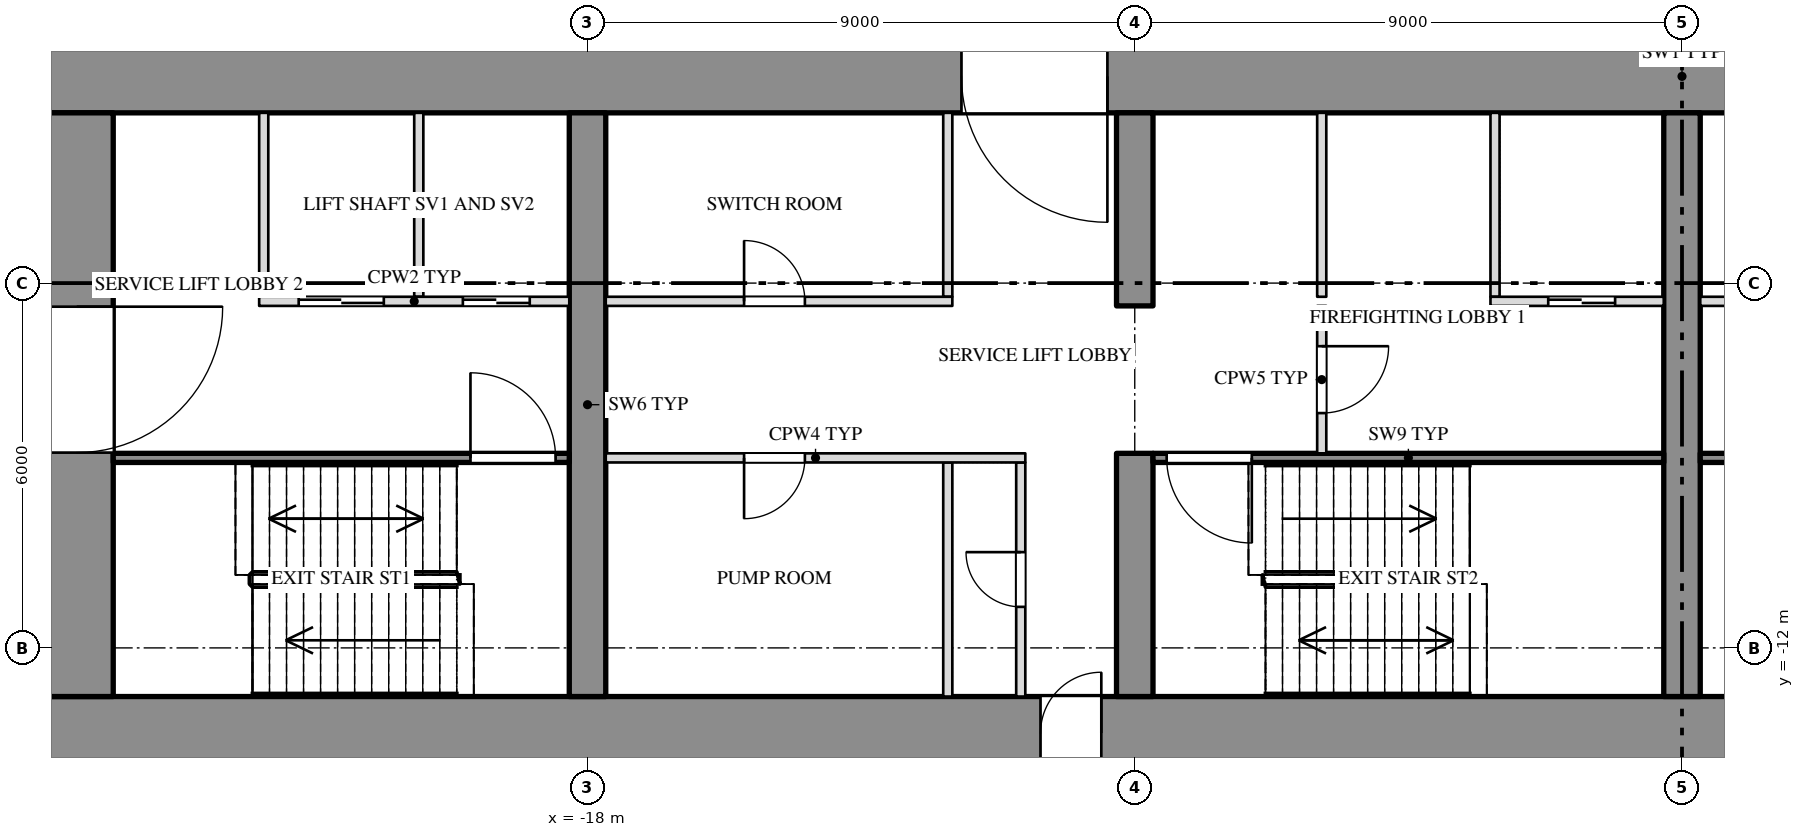
"""IFC4 building model, lengths in metres.
Left out: names, types, materials, properties, quantities, classifications, styles, units other than length and angle.
Written with IfcOpenShell. Run it as: python <this file> out.ifc"""

import sys

from ifc_helpers import new_model, si_unit, direction, frame, frame_2d, origin, place, context, subcontext, project, spatial, rectangle, extrude, element, fill, save


model = new_model("IFC4")
c1 = context("Model", 3, precision=1e-05, world=origin(), true_north=direction((0.0, 1.0)))
c2 = subcontext(c1, "Body", "Model", "MODEL_VIEW")
j1 = project(units=[si_unit("LENGTHUNIT", "METRE"), si_unit("PLANEANGLEUNIT", "RADIAN")], contexts=[c1])
p1 = place(None, origin())
s1 = spatial("IfcSite", under=j1, at=p1, CompositionType="ELEMENT")
p2 = place(p1, origin())
s2 = spatial("IfcBuilding", under=s1, at=p2, CompositionType="ELEMENT")
p3 = place(p2, frame((0.0, 0.0, -8.4)))
s3 = spatial("IfcBuildingStorey", under=s2, at=p3, CompositionType="ELEMENT", Elevation=-8.4)
p4 = place(p3, frame((-27.0, -2.6, 0.0), z_axis=(0.0, 0.0, 1.0), x_axis=(1.0, 0.0, 0.0)))
e1 = element("IfcWall", 1, at=p4, inside=s3, PredefinedType="SHEAR", context=c2, shape_type="SweptSolid", body=[
    extrude(rectangle(XDim=54.0, YDim=1.2, at=frame_2d((27.0, 0.0))), origin(), (0.0, 0.0, 1.0), 3.9),
])
p5 = place(p4, frame((15.15, 0.0, 0.0)))
e2 = element("IfcOpeningElement", 2, at=p5, cuts=e1, PredefinedType="OPENING", context=c2, shape_type="SweptSolid", body=[
    extrude(rectangle(XDim=2.4, YDim=2.1, at=frame_2d((1.2, 1.05))), frame((0.0, 0.612, 0.0), z_axis=(0.0, -1.0, 0.0), x_axis=(1.0, 0.0, 0.0)), (0.0, 0.0, 1.0), 1.224),
])
p6 = place(p4, frame((36.45, 0.0, 0.0)))
e3 = element("IfcOpeningElement", 3, at=p6, cuts=e1, PredefinedType="OPENING", context=c2, shape_type="SweptSolid", body=[
    extrude(rectangle(XDim=2.4, YDim=2.1, at=frame_2d((1.2, 1.05))), frame((0.0, 0.612, 0.0), z_axis=(0.0, -1.0, 0.0), x_axis=(1.0, 0.0, 0.0)), (0.0, 0.0, 1.0), 1.224),
])
p7 = place(p3, frame((-27.0, -13.4, 0.0), z_axis=(0.0, 0.0, 1.0), x_axis=(1.0, 0.0, 0.0)))
e4 = element("IfcWall", 4, at=p7, inside=s3, PredefinedType="SHEAR", context=c2, shape_type="SweptSolid", body=[
    extrude(rectangle(XDim=54.0, YDim=1.2, at=frame_2d((27.0, 0.0))), origin(), (0.0, 0.0, 1.0), 3.9),
])
p8 = place(p7, frame((16.45, 0.0, 0.0)))
e5 = element("IfcOpeningElement", 5, at=p8, cuts=e4, PredefinedType="OPENING", context=c2, shape_type="SweptSolid", body=[
    extrude(rectangle(XDim=1.0, YDim=2.1, at=frame_2d((0.5, 1.05))), frame((0.0, 0.612, 0.0), z_axis=(0.0, -1.0, 0.0), x_axis=(1.0, 0.0, 0.0)), (0.0, 0.0, 1.0), 1.224),
])
p9 = place(p7, frame((36.55, 0.0, 0.0)))
e6 = element("IfcOpeningElement", 6, at=p9, cuts=e4, PredefinedType="OPENING", context=c2, shape_type="SweptSolid", body=[
    extrude(rectangle(XDim=1.0, YDim=2.1, at=frame_2d((0.5, 1.05))), frame((0.0, 0.612, 0.0), z_axis=(0.0, -1.0, 0.0), x_axis=(1.0, 0.0, 0.0)), (0.0, 0.0, 1.0), 1.224),
])
p10 = place(p3, frame((-26.4, -12.8, 0.0), z_axis=(0.0, 0.0, 1.0), x_axis=(0.0, 1.0, 0.0)))
e7 = element("IfcWall", 7, at=p10, inside=s3, PredefinedType="SHEAR", context=c2, shape_type="SweptSolid", body=[
    extrude(rectangle(XDim=9.6, YDim=1.2, at=frame_2d((4.8, 0.0))), origin(), (0.0, 0.0, 1.0), 3.9),
])
p11 = place(p10, frame((4.012, 0.0, 0.0)))
e8 = element("IfcOpeningElement", 8, at=p11, cuts=e7, PredefinedType="OPENING", context=c2, shape_type="SweptSolid", body=[
    extrude(rectangle(XDim=2.4, YDim=2.1, at=frame_2d((1.2, 1.05))), frame((0.0, 0.612, 0.0), z_axis=(0.0, -1.0, 0.0), x_axis=(1.0, 0.0, 0.0)), (0.0, 0.0, 1.0), 1.224),
])
p12 = place(p3, frame((-18.0, -12.8, 0.0), z_axis=(0.0, 0.0, 1.0), x_axis=(0.0, 1.0, 0.0)))
e9 = element("IfcWall", 9, at=p12, inside=s3, PredefinedType="SHEAR", context=c2, shape_type="SweptSolid", body=[
    extrude(rectangle(XDim=9.6, YDim=0.6, at=frame_2d((4.8, 0.0))), origin(), (0.0, 0.0, 1.0), 3.9),
])
p13 = place(p3, frame((-9.0, -12.8, 0.0), z_axis=(0.0, 0.0, 1.0), x_axis=(0.0, 1.0, 0.0)))
e10 = element("IfcWall", 10, at=p13, inside=s3, PredefinedType="SHEAR", context=c2, shape_type="SweptSolid", body=[
    extrude(rectangle(XDim=4.0, YDim=0.6, at=frame_2d((2.0, 0.0))), origin(), (0.0, 0.0, 1.0), 3.9),
])
p14 = place(p3, frame((-9.0, -6.375, 0.0), z_axis=(0.0, 0.0, 1.0), x_axis=(0.0, 1.0, 0.0)))
e11 = element("IfcWall", 11, at=p14, inside=s3, PredefinedType="SHEAR", context=c2, shape_type="SweptSolid", body=[
    extrude(rectangle(XDim=3.175, YDim=0.6, at=frame_2d((1.587, 0.0))), origin(), (0.0, 0.0, 1.0), 3.9),
])
p15 = place(p3, frame((0.0, -12.8, 0.0), z_axis=(0.0, 0.0, 1.0), x_axis=(0.0, 1.0, 0.0)))
e12 = element("IfcWall", 12, at=p15, inside=s3, PredefinedType="SHEAR", context=c2, shape_type="SweptSolid", body=[
    extrude(rectangle(XDim=9.6, YDim=0.6, at=frame_2d((4.8, 0.0))), origin(), (0.0, 0.0, 1.0), 3.9),
])
for number, where, z_axis, x_axis in (
    (13, (-20.775, -6.225, 0.0), (0.0, 0.0, 1.0), (0.0, 1.0, 0.0)),
    (14, (-23.325, -6.225, 0.0), (0.0, 0.0, 1.0), (0.0, 1.0, 0.0)),
    (15, (-12.075, -6.225, 0.0), (0.0, 0.0, 1.0), (0.0, 1.0, 0.0)),
    (16, (-3.075, -6.225, 0.0), (0.0, 0.0, 1.0), (0.0, 1.0, 0.0)),
    (17, (-5.925, -6.225, 0.0), (0.0, 0.0, 1.0), (0.0, 1.0, 0.0)),
):
    element("IfcWall", number, at=place(p3, frame(where, z_axis=z_axis, x_axis=x_axis)), inside=s3, PredefinedType="PARTITIONING", context=c2, shape_type="SweptSolid", body=[
        extrude(rectangle(XDim=3.025, YDim=0.15, at=frame_2d((1.513, 0.0))), origin(), (0.0, 0.0, 1.0), 3.9),
    ])
p16 = place(p3, frame((-10.875, -12.8, 0.0), z_axis=(0.0, 0.0, 1.0), x_axis=(0.0, 1.0, 0.0)))
e18 = element("IfcWall", 18, at=p16, inside=s3, PredefinedType="PARTITIONING", context=c2, shape_type="SweptSolid", body=[
    extrude(rectangle(XDim=3.85, YDim=0.15, at=frame_2d((1.925, 0.0))), origin(), (0.0, 0.0, 1.0), 3.9),
])
p17 = place(p16, frame((1.475, 0.0, 0.0)))
e19 = element("IfcOpeningElement", 19, at=p17, cuts=e18, PredefinedType="OPENING", context=c2, shape_type="SweptSolid", body=[
    extrude(rectangle(XDim=0.9, YDim=2.1, at=frame_2d((0.45, 1.05))), frame((0.0, 0.087, 0.0), z_axis=(0.0, -1.0, 0.0), x_axis=(1.0, 0.0, 0.0)), (0.0, 0.0, 1.0), 0.174),
])
p18 = place(p3, frame((-12.075, -12.8, 0.0), z_axis=(0.0, 0.0, 1.0), x_axis=(0.0, 1.0, 0.0)))
e20 = element("IfcWall", 20, at=p18, inside=s3, PredefinedType="PARTITIONING", context=c2, shape_type="SweptSolid", body=[
    extrude(rectangle(XDim=3.85, YDim=0.15, at=frame_2d((1.925, 0.0))), origin(), (0.0, 0.0, 1.0), 3.9),
])
p19 = place(p3, frame((-5.925, -8.8, 0.0), z_axis=(0.0, 0.0, 1.0), x_axis=(0.0, 1.0, 0.0)))
e21 = element("IfcWall", 21, at=p19, inside=s3, PredefinedType="PARTITIONING", context=c2, shape_type="SweptSolid", body=[
    extrude(rectangle(XDim=2.425, YDim=0.15, at=frame_2d((1.212, 0.0))), origin(), (0.0, 0.0, 1.0), 3.9),
])
p20 = place(p19, frame((0.662, 0.0, 0.0)))
e22 = element("IfcOpeningElement", 22, at=p20, cuts=e21, PredefinedType="OPENING", context=c2, shape_type="SweptSolid", body=[
    extrude(rectangle(XDim=1.1, YDim=2.1, at=frame_2d((0.55, 1.05))), frame((0.0, 0.087, 0.0), z_axis=(0.0, -1.0, 0.0), x_axis=(1.0, 0.0, 0.0)), (0.0, 0.0, 1.0), 0.174),
])
p21 = place(p3, frame((-23.4, -6.3, 0.0), z_axis=(0.0, 0.0, 1.0), x_axis=(1.0, 0.0, 0.0)))
e23 = element("IfcWall", 23, at=p21, inside=s3, PredefinedType="PARTITIONING", context=c2, shape_type="SweptSolid", body=[
    extrude(rectangle(XDim=5.1, YDim=0.15, at=frame_2d((2.55, 0.0))), origin(), (0.0, 0.0, 1.0), 3.9),
])
p22 = place(p21, frame((0.65, 0.0, 0.0)))
e24 = element("IfcOpeningElement", 24, at=p22, cuts=e23, PredefinedType="OPENING", context=c2, shape_type="SweptSolid", body=[
    extrude(rectangle(XDim=1.4, YDim=2.1, at=frame_2d((0.7, 1.05))), frame((0.0, 0.087, 0.0), z_axis=(0.0, -1.0, 0.0), x_axis=(1.0, 0.0, 0.0)), (0.0, 0.0, 1.0), 0.174),
])
p23 = place(p21, frame((3.35, 0.0, 0.0)))
e25 = element("IfcOpeningElement", 25, at=p23, cuts=e23, PredefinedType="OPENING", context=c2, shape_type="SweptSolid", body=[
    extrude(rectangle(XDim=1.1, YDim=2.1, at=frame_2d((0.55, 1.05))), frame((0.0, 0.087, 0.0), z_axis=(0.0, -1.0, 0.0), x_axis=(1.0, 0.0, 0.0)), (0.0, 0.0, 1.0), 0.174),
])
p24 = place(p3, frame((-17.7, -6.3, 0.0), z_axis=(0.0, 0.0, 1.0), x_axis=(1.0, 0.0, 0.0)))
e26 = element("IfcWall", 26, at=p24, inside=s3, PredefinedType="PARTITIONING", context=c2, shape_type="SweptSolid", body=[
    extrude(rectangle(XDim=5.7, YDim=0.15, at=frame_2d((2.85, 0.0))), origin(), (0.0, 0.0, 1.0), 3.9),
])
p25 = place(p24, frame((2.275, 0.0, 0.0)))
e27 = element("IfcOpeningElement", 27, at=p25, cuts=e26, PredefinedType="OPENING", context=c2, shape_type="SweptSolid", body=[
    extrude(rectangle(XDim=1.0, YDim=2.1, at=frame_2d((0.5, 1.05))), frame((0.0, 0.087, 0.0), z_axis=(0.0, -1.0, 0.0), x_axis=(1.0, 0.0, 0.0)), (0.0, 0.0, 1.0), 0.174),
])
p26 = place(p3, frame((-3.15, -6.3, 0.0), z_axis=(0.0, 0.0, 1.0), x_axis=(1.0, 0.0, 0.0)))
e28 = element("IfcWall", 28, at=p26, inside=s3, PredefinedType="PARTITIONING", context=c2, shape_type="SweptSolid", body=[
    extrude(rectangle(XDim=2.85, YDim=0.15, at=frame_2d((1.425, 0.0))), origin(), (0.0, 0.0, 1.0), 3.9),
])
p27 = place(p26, frame((0.95, 0.0, 0.0)))
e29 = element("IfcOpeningElement", 29, at=p27, cuts=e28, PredefinedType="OPENING", context=c2, shape_type="SweptSolid", body=[
    extrude(rectangle(XDim=1.1, YDim=2.1, at=frame_2d((0.55, 1.05))), frame((0.0, 0.087, 0.0), z_axis=(0.0, -1.0, 0.0), x_axis=(1.0, 0.0, 0.0)), (0.0, 0.0, 1.0), 0.174),
])
p28 = place(p3, frame((0.3, -6.3, 0.0), z_axis=(0.0, 0.0, 1.0), x_axis=(1.0, 0.0, 0.0)))
e30 = element("IfcWall", 30, at=p28, inside=s3, PredefinedType="PARTITIONING", context=c2, shape_type="SweptSolid", body=[
    extrude(rectangle(XDim=2.85, YDim=0.15, at=frame_2d((1.425, 0.0))), origin(), (0.0, 0.0, 1.0), 3.9),
])
p29 = place(p28, frame((0.8, 0.0, 0.0)))
e31 = element("IfcOpeningElement", 31, at=p29, cuts=e30, PredefinedType="OPENING", context=c2, shape_type="SweptSolid", body=[
    extrude(rectangle(XDim=1.1, YDim=2.1, at=frame_2d((0.55, 1.05))), frame((0.0, 0.087, 0.0), z_axis=(0.0, -1.0, 0.0), x_axis=(1.0, 0.0, 0.0)), (0.0, 0.0, 1.0), 0.174),
])
p30 = place(p3, frame((-25.8, -8.875, 0.0), z_axis=(0.0, 0.0, 1.0), x_axis=(1.0, 0.0, 0.0)))
e32 = element("IfcWall", 32, at=p30, inside=s3, PredefinedType="SHEAR", context=c2, shape_type="SweptSolid", body=[
    extrude(rectangle(XDim=7.5, YDim=0.15, at=frame_2d((3.75, 0.0))), origin(), (0.0, 0.0, 1.0), 3.9),
])
p31 = place(p30, frame((5.875, 0.0, 0.0)))
e33 = element("IfcOpeningElement", 33, at=p31, cuts=e32, PredefinedType="OPENING", context=c2, shape_type="SweptSolid", body=[
    extrude(rectangle(XDim=1.4, YDim=2.1, at=frame_2d((0.7, 1.05))), frame((0.0, 0.087, 0.0), z_axis=(0.0, -1.0, 0.0), x_axis=(1.0, 0.0, 0.0)), (0.0, 0.0, 1.0), 0.174),
])
p32 = place(p3, frame((-17.7, -8.875, 0.0), z_axis=(0.0, 0.0, 1.0), x_axis=(1.0, 0.0, 0.0)))
e34 = element("IfcWall", 34, at=p32, inside=s3, PredefinedType="PARTITIONING", context=c2, shape_type="SweptSolid", body=[
    extrude(rectangle(XDim=6.9, YDim=0.15, at=frame_2d((3.45, 0.0))), origin(), (0.0, 0.0, 1.0), 3.9),
])
p33 = place(p32, frame((2.275, 0.0, 0.0)))
e35 = element("IfcOpeningElement", 35, at=p33, cuts=e34, PredefinedType="OPENING", context=c2, shape_type="SweptSolid", body=[
    extrude(rectangle(XDim=1.0, YDim=2.1, at=frame_2d((0.5, 1.05))), frame((0.0, 0.087, 0.0), z_axis=(0.0, -1.0, 0.0), x_axis=(1.0, 0.0, 0.0)), (0.0, 0.0, 1.0), 0.174),
])
p34 = place(p3, frame((-8.7, -8.875, 0.0), z_axis=(0.0, 0.0, 1.0), x_axis=(1.0, 0.0, 0.0)))
e36 = element("IfcWall", 36, at=p34, inside=s3, PredefinedType="SHEAR", context=c2, shape_type="SweptSolid", body=[
    extrude(rectangle(XDim=8.4, YDim=0.15, at=frame_2d((4.2, 0.0))), origin(), (0.0, 0.0, 1.0), 3.9),
])
p35 = place(p34, frame((0.225, 0.0, 0.0)))
e37 = element("IfcOpeningElement", 37, at=p35, cuts=e36, PredefinedType="OPENING", context=c2, shape_type="SweptSolid", body=[
    extrude(rectangle(XDim=1.4, YDim=2.1, at=frame_2d((0.7, 1.05))), frame((0.0, 0.087, 0.0), z_axis=(0.0, -1.0, 0.0), x_axis=(1.0, 0.0, 0.0)), (0.0, 0.0, 1.0), 0.174),
])
p36 = place(p3, frame((0.3, -8.875, 0.0), z_axis=(0.0, 0.0, 1.0), x_axis=(1.0, 0.0, 0.0)))
e38 = element("IfcWall", 38, at=p36, inside=s3, PredefinedType="SHEAR", context=c2, shape_type="SweptSolid", body=[
    extrude(rectangle(XDim=8.4, YDim=0.15, at=frame_2d((4.2, 0.0))), origin(), (0.0, 0.0, 1.0), 3.9),
])
p37 = place(p36, frame((6.775, 0.0, 0.0)))
e39 = element("IfcOpeningElement", 39, at=p37, cuts=e38, PredefinedType="OPENING", context=c2, shape_type="SweptSolid", body=[
    extrude(rectangle(XDim=1.4, YDim=2.1, at=frame_2d((0.7, 1.05))), frame((0.0, 0.087, 0.0), z_axis=(0.0, -1.0, 0.0), x_axis=(1.0, 0.0, 0.0)), (0.0, 0.0, 1.0), 0.174),
])
p38 = place(p11, origin())
e40 = element("IfcDoor", 40, at=p38, inside=s3, OperationType="DOUBLE_DOOR_SINGLE_SWING", PredefinedType="DOOR", context=c2, shape_type="SweptSolid", body=[
    extrude(rectangle(XDim=2.4, YDim=2.1, at=frame_2d((1.2, 1.05))), frame((0.0, 0.025, 0.0), z_axis=(0.0, -1.0, 0.0), x_axis=(1.0, 0.0, 0.0)), (0.0, 0.0, 1.0), 0.05),
])
fill(e8, e40)
p39 = place(p22, origin())
e41 = element("IfcDoor", 41, at=p39, inside=s3, OperationType="SLIDING_TO_RIGHT", PredefinedType="DOOR", context=c2, shape_type="SweptSolid", body=[
    extrude(rectangle(XDim=1.4, YDim=2.1, at=frame_2d((0.7, 1.05))), frame((0.0, 0.025, 0.0), z_axis=(0.0, -1.0, 0.0), x_axis=(1.0, 0.0, 0.0)), (0.0, 0.0, 1.0), 0.05),
])
fill(e24, e41)
p40 = place(p23, origin())
e42 = element("IfcDoor", 42, at=p40, inside=s3, OperationType="SLIDING_TO_LEFT", PredefinedType="DOOR", context=c2, shape_type="SweptSolid", body=[
    extrude(rectangle(XDim=1.1, YDim=2.1, at=frame_2d((0.55, 1.05))), frame((0.0, 0.025, 0.0), z_axis=(0.0, -1.0, 0.0), x_axis=(1.0, 0.0, 0.0)), (0.0, 0.0, 1.0), 0.05),
])
fill(e25, e42)
p41 = place(p31, origin())
e43 = element("IfcDoor", 43, at=p41, inside=s3, OperationType="DOUBLE_DOOR_SINGLE_SWING", PredefinedType="DOOR", context=c2, shape_type="SweptSolid", body=[
    extrude(rectangle(XDim=1.4, YDim=2.1, at=frame_2d((0.7, 1.05))), frame((0.0, 0.025, 0.0), z_axis=(0.0, -1.0, 0.0), x_axis=(1.0, 0.0, 0.0)), (0.0, 0.0, 1.0), 0.05),
])
fill(e33, e43)
p42 = place(p33, origin())
e44 = element("IfcDoor", 44, at=p42, inside=s3, OperationType="SINGLE_SWING_RIGHT", PredefinedType="DOOR", context=c2, shape_type="SweptSolid", body=[
    extrude(rectangle(XDim=1.0, YDim=2.1, at=frame_2d((0.5, 1.05))), frame((0.0, 0.025, 0.0), z_axis=(0.0, -1.0, 0.0), x_axis=(1.0, 0.0, 0.0)), (0.0, 0.0, 1.0), 0.05),
])
fill(e35, e44)
p43 = place(p25, origin())
e45 = element("IfcDoor", 45, at=p43, inside=s3, OperationType="SINGLE_SWING_LEFT", PredefinedType="DOOR", context=c2, shape_type="SweptSolid", body=[
    extrude(rectangle(XDim=1.0, YDim=2.1, at=frame_2d((0.5, 1.05))), frame((0.0, 0.025, 0.0), z_axis=(0.0, -1.0, 0.0), x_axis=(1.0, 0.0, 0.0)), (0.0, 0.0, 1.0), 0.05),
])
fill(e27, e45)
p44 = place(p17, origin())
e46 = element("IfcDoor", 46, at=p44, inside=s3, OperationType="SINGLE_SWING_RIGHT", PredefinedType="DOOR", context=c2, shape_type="SweptSolid", body=[
    extrude(rectangle(XDim=0.9, YDim=2.1, at=frame_2d((0.45, 1.05))), frame((0.0, 0.025, 0.0), z_axis=(0.0, -1.0, 0.0), x_axis=(1.0, 0.0, 0.0)), (0.0, 0.0, 1.0), 0.05),
])
fill(e19, e46)
p45 = place(p5, origin())
e47 = element("IfcDoor", 47, at=p45, inside=s3, OperationType="DOUBLE_DOOR_SINGLE_SWING", PredefinedType="DOOR", context=c2, shape_type="SweptSolid", body=[
    extrude(rectangle(XDim=2.4, YDim=2.1, at=frame_2d((1.2, 1.05))), frame((0.0, 0.025, 0.0), z_axis=(0.0, -1.0, 0.0), x_axis=(1.0, 0.0, 0.0)), (0.0, 0.0, 1.0), 0.05),
])
fill(e2, e47)
p46 = place(p8, origin())
e48 = element("IfcDoor", 48, at=p46, inside=s3, OperationType="SINGLE_SWING_RIGHT", PredefinedType="DOOR", context=c2, shape_type="SweptSolid", body=[
    extrude(rectangle(XDim=1.0, YDim=2.1, at=frame_2d((0.5, 1.05))), frame((0.0, 0.025, 0.0), z_axis=(0.0, -1.0, 0.0), x_axis=(1.0, 0.0, 0.0)), (0.0, 0.0, 1.0), 0.05),
])
fill(e5, e48)
p47 = place(p35, origin())
e49 = element("IfcDoor", 49, at=p47, inside=s3, OperationType="DOUBLE_DOOR_SINGLE_SWING", PredefinedType="DOOR", context=c2, shape_type="SweptSolid", body=[
    extrude(rectangle(XDim=1.4, YDim=2.1, at=frame_2d((0.7, 1.05))), frame((0.0, 0.025, 0.0), z_axis=(0.0, -1.0, 0.0), x_axis=(1.0, 0.0, 0.0)), (0.0, 0.0, 1.0), 0.05),
])
fill(e37, e49)
p48 = place(p20, origin())
e50 = element("IfcDoor", 50, at=p48, inside=s3, OperationType="SINGLE_SWING_LEFT", PredefinedType="DOOR", context=c2, shape_type="SweptSolid", body=[
    extrude(rectangle(XDim=1.1, YDim=2.1, at=frame_2d((0.55, 1.05))), frame((0.0, 0.025, 0.0), z_axis=(0.0, -1.0, 0.0), x_axis=(1.0, 0.0, 0.0)), (0.0, 0.0, 1.0), 0.05),
])
fill(e22, e50)
p49 = place(p27, origin())
e51 = element("IfcDoor", 51, at=p49, inside=s3, OperationType="SLIDING_TO_RIGHT", PredefinedType="DOOR", context=c2, shape_type="SweptSolid", body=[
    extrude(rectangle(XDim=1.1, YDim=2.1, at=frame_2d((0.55, 1.05))), frame((0.0, 0.025, 0.0), z_axis=(0.0, -1.0, 0.0), x_axis=(1.0, 0.0, 0.0)), (0.0, 0.0, 1.0), 0.05),
])
fill(e29, e51)
save(model, sys.argv[1])
